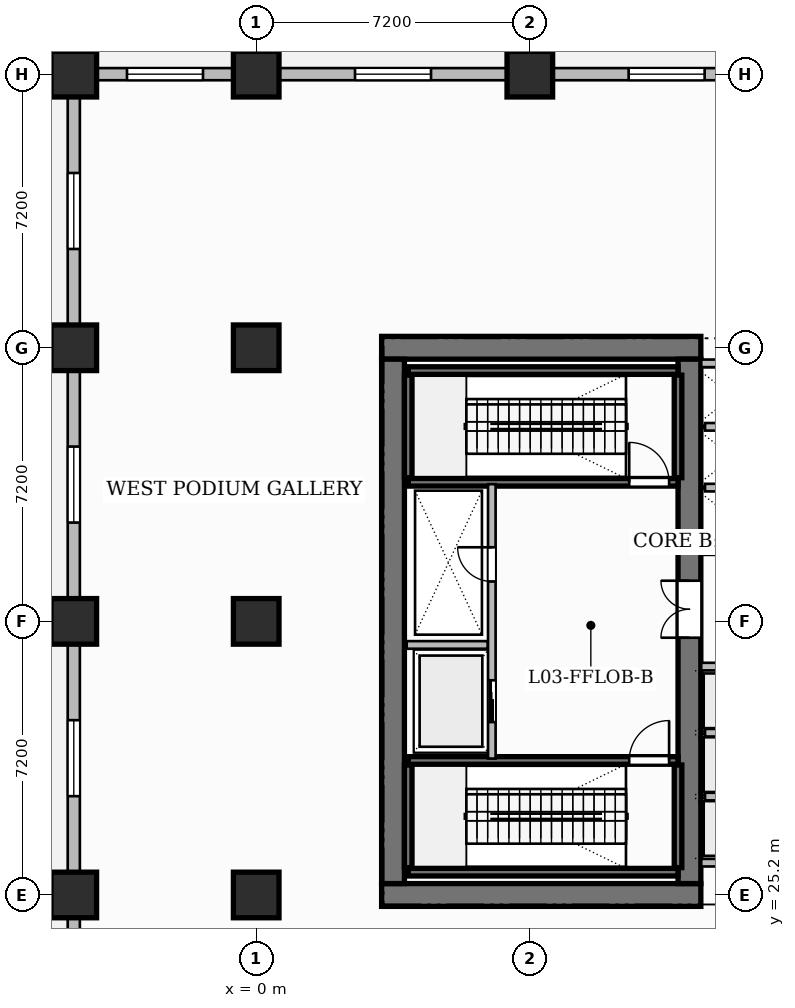
"""IFC4 building model, lengths in metres.
Left out: names, types, materials, properties, quantities, classifications, styles, units other than length and angle.
Written with IfcOpenShell. Run it as: python <this file> out.ifc"""

import sys

from ifc_helpers import new_model, si_unit, direction, frame, frame_2d, origin, origin_2d, place, context, subcontext, project, spatial, rectangle, extrude, source, transform, mapped, element, fill, save


model = new_model("IFC4")
c1 = context("Model", 3, precision=1e-05, world=origin(), true_north=direction((0.0, 1.0)))
c2 = subcontext(c1, "Body", "Model", "MODEL_VIEW")
j1 = project(units=[si_unit("LENGTHUNIT", "METRE"), si_unit("PLANEANGLEUNIT", "RADIAN")], contexts=[c1])
p1 = place(None, origin())
s1 = spatial("IfcSite", under=j1, at=p1, CompositionType="ELEMENT")
p2 = place(p1, origin())
s2 = spatial("IfcBuilding", under=s1, at=p2, CompositionType="ELEMENT")
p3 = place(p2, frame((0.0, 0.0, 16.2)))
s3 = spatial("IfcBuildingStorey", under=s2, at=p3, CompositionType="ELEMENT", Elevation=16.2)
for number, where, z_axis, x_axis in (
    (1, (3.3, 25.2, 0.0), (0.0, 0.0, 1.0), (1.0, 0.0, 0.0)),
    (2, (3.3, 39.6, 0.0), (0.0, 0.0, 1.0), (1.0, 0.0, 0.0)),
):
    element("IfcWall", number, at=place(p3, frame(where, z_axis=z_axis, x_axis=x_axis)), inside=s3, PredefinedType="SHEAR", context=c2, shape_type="SweptSolid", body=[
        extrude(rectangle(XDim=8.4, YDim=0.6, at=frame_2d((4.2, 0.0))), origin(), (0.0, 0.0, 1.0), 5.4),
    ])
p4 = place(p3, frame((3.6, 25.5, 0.0), z_axis=(0.0, 0.0, 1.0), x_axis=(0.0, 1.0, 0.0)))
e3 = element("IfcWall", 3, at=p4, inside=s3, PredefinedType="SHEAR", context=c2, shape_type="SweptSolid", body=[
    extrude(rectangle(XDim=13.8, YDim=0.6, at=frame_2d((6.9, 0.0))), origin(), (0.0, 0.0, 1.0), 5.4),
])
p5 = place(p3, frame((11.4, 25.5, 0.0), z_axis=(0.0, 0.0, 1.0), x_axis=(0.0, 1.0, 0.0)))
e4 = element("IfcWall", 4, at=p5, inside=s3, PredefinedType="SHEAR", context=c2, shape_type="SweptSolid", body=[
    extrude(rectangle(XDim=13.8, YDim=0.6, at=frame_2d((6.9, 0.0))), origin(), (0.0, 0.0, 1.0), 5.4),
])
p6 = place(p5, frame((6.47, 0.0, 0.0)))
e5 = element("IfcOpeningElement", 5, at=p6, cuts=e4, PredefinedType="OPENING", context=c2, shape_type="SweptSolid", body=[
    extrude(rectangle(XDim=1.5, YDim=2.2, at=frame_2d((0.75, 1.1))), frame((0.0, 0.31, 0.0), z_axis=(0.0, -1.0, 0.0), x_axis=(1.0, 0.0, 0.0)), (0.0, 0.0, 1.0), 0.62),
])
m1 = source(origin(), c2, "Body", "SweptSolid", [
    extrude(rectangle(XDim=1.2, YDim=1.2, at=origin_2d()), origin(), (0.0, 0.0, 1.0), 5.4),
])
for number, where, z_axis, x_axis in (
    (6, (-4.8, 25.2, 0.0), (0.0, 0.0, 1.0), (1.0, 0.0, 0.0)),
    (7, (-4.8, 32.4, 0.0), (0.0, 0.0, 1.0), (1.0, 0.0, 0.0)),
    (8, (-4.8, 39.6, 0.0), (0.0, 0.0, 1.0), (1.0, 0.0, 0.0)),
    (9, (-4.8, 46.8, 0.0), (0.0, 0.0, 1.0), (1.0, 0.0, 0.0)),
    (10, (0.0, 25.2, 0.0), (0.0, 0.0, 1.0), (1.0, 0.0, 0.0)),
    (11, (0.0, 32.4, 0.0), (0.0, 0.0, 1.0), (1.0, 0.0, 0.0)),
    (12, (0.0, 39.6, 0.0), (0.0, 0.0, 1.0), (1.0, 0.0, 0.0)),
    (13, (0.0, 46.8, 0.0), (0.0, 0.0, 1.0), (1.0, 0.0, 0.0)),
    (14, (7.2, 46.8, 0.0), (0.0, 0.0, 1.0), (1.0, 0.0, 0.0)),
):
    element("IfcColumn", number, at=place(p3, frame(where, z_axis=z_axis, x_axis=x_axis)), inside=s3, PredefinedType="COLUMN", context=c2, shape_type="MappedRepresentation", body=[
        mapped(m1, transform((0.0, 0.0, 0.0), scale=1.0)),
    ])
p7 = place(p3, frame((4.0, 25.8, 0.0), z_axis=(0.0, 0.0, 1.0), x_axis=(1.0, 0.0, 0.0)))
e15 = element("IfcWall", 15, at=p7, inside=s3, PredefinedType="SHEAR", context=c2, shape_type="SweptSolid", body=[
    extrude(rectangle(XDim=7.1, YDim=0.2, at=frame_2d((3.55, 0.0))), origin(), (0.0, 0.0, 1.0), 5.4),
])
for number, where, z_axis, x_axis in (
    (16, (4.0, 25.92, 0.0), (0.0, 0.0, 1.0), (0.0, 1.0, 0.0)),
    (17, (11.1, 25.92, 0.0), (0.0, 0.0, 1.0), (0.0, 1.0, 0.0)),
):
    element("IfcWall", number, at=place(p3, frame(where, z_axis=z_axis, x_axis=x_axis)), inside=s3, PredefinedType="SHEAR", context=c2, shape_type="SweptSolid", body=[
        extrude(rectangle(XDim=2.7, YDim=0.2, at=frame_2d((1.35, 0.0))), origin(), (0.0, 0.0, 1.0), 5.4),
    ])
p8 = place(p3, frame((4.0, 28.74, 0.0), z_axis=(0.0, 0.0, 1.0), x_axis=(1.0, 0.0, 0.0)))
e18 = element("IfcWall", 18, at=p8, inside=s3, PredefinedType="SHEAR", context=c2, shape_type="SweptSolid", body=[
    extrude(rectangle(XDim=7.1, YDim=0.2, at=frame_2d((3.55, 0.0))), origin(), (0.0, 0.0, 1.0), 5.4),
])
p9 = place(p8, frame((5.815, 0.0, 0.0)))
e19 = element("IfcOpeningElement", 19, at=p9, cuts=e18, PredefinedType="OPENING", context=c2, shape_type="SweptSolid", body=[
    extrude(rectangle(XDim=1.05, YDim=2.2, at=frame_2d((0.525, 1.1))), frame((0.0, 0.11, 0.0), z_axis=(0.0, -1.0, 0.0), x_axis=(1.0, 0.0, 0.0)), (0.0, 0.0, 1.0), 0.22),
])
p10 = place(p3, frame((4.0, 39.0, 0.0), z_axis=(0.0, 0.0, 1.0), x_axis=(1.0, 0.0, 0.0)))
e20 = element("IfcWall", 20, at=p10, inside=s3, PredefinedType="SHEAR", context=c2, shape_type="SweptSolid", body=[
    extrude(rectangle(XDim=7.1, YDim=0.2, at=frame_2d((3.55, 0.0))), origin(), (0.0, 0.0, 1.0), 5.4),
])
for number, where, z_axis, x_axis in (
    (21, (4.0, 36.18, 0.0), (0.0, 0.0, 1.0), (0.0, 1.0, 0.0)),
    (22, (11.1, 36.18, 0.0), (0.0, 0.0, 1.0), (0.0, 1.0, 0.0)),
):
    element("IfcWall", number, at=place(p3, frame(where, z_axis=z_axis, x_axis=x_axis)), inside=s3, PredefinedType="SHEAR", context=c2, shape_type="SweptSolid", body=[
        extrude(rectangle(XDim=2.7, YDim=0.2, at=frame_2d((1.35, 0.0))), origin(), (0.0, 0.0, 1.0), 5.4),
    ])
p11 = place(p3, frame((4.0, 36.06, 0.0), z_axis=(0.0, 0.0, 1.0), x_axis=(1.0, 0.0, 0.0)))
e23 = element("IfcWall", 23, at=p11, inside=s3, PredefinedType="SHEAR", context=c2, shape_type="SweptSolid", body=[
    extrude(rectangle(XDim=7.1, YDim=0.2, at=frame_2d((3.55, 0.0))), origin(), (0.0, 0.0, 1.0), 5.4),
])
p12 = place(p11, frame((5.815, 0.0, 0.0)))
e24 = element("IfcOpeningElement", 24, at=p12, cuts=e23, PredefinedType="OPENING", context=c2, shape_type="SweptSolid", body=[
    extrude(rectangle(XDim=1.05, YDim=2.2, at=frame_2d((0.525, 1.1))), frame((0.0, 0.11, 0.0), z_axis=(0.0, -1.0, 0.0), x_axis=(1.0, 0.0, 0.0)), (0.0, 0.0, 1.0), 0.22),
])
p13 = place(p3, frame((6.2, 28.79, 0.0), z_axis=(0.0, 0.0, 1.0), x_axis=(0.0, 1.0, 0.0)))
e25 = element("IfcWall", 25, at=p13, inside=s3, PredefinedType="PARTITIONING", context=c2, shape_type="SweptSolid", body=[
    extrude(rectangle(XDim=7.22, YDim=0.2, at=frame_2d((3.61, 0.0))), origin(), (0.0, 0.0, 1.0), 5.1),
])
p14 = place(p13, frame((4.66, 0.0, 0.0)))
e26 = element("IfcOpeningElement", 26, at=p14, cuts=e25, PredefinedType="OPENING", context=c2, shape_type="SweptSolid", body=[
    extrude(rectangle(XDim=0.9, YDim=2.1, at=frame_2d((0.45, 1.05))), frame((0.0, 0.11, 0.0), z_axis=(0.0, -1.0, 0.0), x_axis=(1.0, 0.0, 0.0)), (0.0, 0.0, 1.0), 0.22),
])
p15 = place(p13, frame((0.96, 0.0, 0.0)))
e27 = element("IfcOpeningElement", 27, at=p15, cuts=e25, PredefinedType="OPENING", context=c2, shape_type="SweptSolid", body=[
    extrude(rectangle(XDim=1.1, YDim=2.2, at=frame_2d((0.55, 1.1))), frame((0.0, 0.11, 0.0), z_axis=(0.0, -1.0, 0.0), x_axis=(1.0, 0.0, 0.0)), (0.0, 0.0, 1.0), 0.22),
])
p16 = place(p3, frame((3.96, 31.78, 0.0), z_axis=(0.0, 0.0, 1.0), x_axis=(1.0, 0.0, 0.0)))
e28 = element("IfcWall", 28, at=p16, inside=s3, PredefinedType="PARTITIONING", context=c2, shape_type="SweptSolid", body=[
    extrude(rectangle(XDim=2.13, YDim=0.2, at=frame_2d((1.065, 0.0))), origin(), (0.0, 0.0, 1.0), 5.1),
])
for number, where, z_axis, x_axis in (
    (29, (11.71, 26.05, 0.0), (0.0, 0.0, 1.0), (1.0, 0.0, 0.0)),
    (30, (11.71, 31.21, 0.0), (0.0, 0.0, 1.0), (1.0, 0.0, 0.0)),
):
    element("IfcWall", number, at=place(p3, frame(where, z_axis=z_axis, x_axis=x_axis)), inside=s3, PredefinedType="PARTITIONING", context=c2, shape_type="SweptSolid", body=[
        extrude(rectangle(XDim=1.96, YDim=0.2, at=frame_2d((0.98, 0.0))), origin(), (0.0, 0.0, 1.0), 5.1),
    ])
for number, where, z_axis, x_axis in (
    (31, (11.81, 27.79, 0.0), (0.0, 0.0, 1.0), (1.0, 0.0, 0.0)),
    (32, (11.81, 29.47, 0.0), (0.0, 0.0, 1.0), (1.0, 0.0, 0.0)),
):
    element("IfcWall", number, at=place(p3, frame(where, z_axis=z_axis, x_axis=x_axis)), inside=s3, PredefinedType="PARTITIONING", context=c2, shape_type="SweptSolid", body=[
        extrude(rectangle(XDim=1.76, YDim=0.2, at=frame_2d((0.88, 0.0))), origin(), (0.0, 0.0, 1.0), 5.1),
    ])
for number, where, z_axis, x_axis in (
    (33, (11.71, 34.25, 0.0), (0.0, 0.0, 1.0), (1.0, 0.0, 0.0)),
    (34, (11.71, 39.19, 0.0), (0.0, 0.0, 1.0), (1.0, 0.0, 0.0)),
):
    element("IfcWall", number, at=place(p3, frame(where, z_axis=z_axis, x_axis=x_axis)), inside=s3, PredefinedType="PARTITIONING", context=c2, shape_type="SweptSolid", body=[
        extrude(rectangle(XDim=1.96, YDim=0.2, at=frame_2d((0.98, 0.0))), origin(), (0.0, 0.0, 1.0), 5.1),
    ])
for number, where, z_axis, x_axis in (
    (35, (11.81, 35.92, 0.0), (0.0, 0.0, 1.0), (1.0, 0.0, 0.0)),
    (36, (11.81, 37.52, 0.0), (0.0, 0.0, 1.0), (1.0, 0.0, 0.0)),
):
    element("IfcWall", number, at=place(p3, frame(where, z_axis=z_axis, x_axis=x_axis)), inside=s3, PredefinedType="PARTITIONING", context=c2, shape_type="SweptSolid", body=[
        extrude(rectangle(XDim=1.76, YDim=0.2, at=frame_2d((0.88, 0.0))), origin(), (0.0, 0.0, 1.0), 5.1),
    ])
p17 = place(p3, frame((-4.8, 46.8, 0.0), z_axis=(0.0, 0.0, 1.0), x_axis=(1.0, 0.0, 0.0)))
e37 = element("IfcWall", 37, at=p17, inside=s3, PredefinedType="SOLIDWALL", context=c2, shape_type="SweptSolid", body=[
    extrude(rectangle(XDim=33.6, YDim=0.32, at=frame_2d((16.8, 0.0))), origin(), (0.0, 0.0, 1.0), 4.185),
])
p18 = place(p17, frame((1.4, 0.0, 0.75)))
e38 = element("IfcOpeningElement", 38, at=p18, cuts=e37, PredefinedType="OPENING", context=c2, shape_type="SweptSolid", body=[
    extrude(rectangle(XDim=2.0, YDim=2.6, at=frame_2d((1.0, 1.3))), frame((0.0, 0.17, 0.0), z_axis=(0.0, -1.0, 0.0), x_axis=(1.0, 0.0, 0.0)), (0.0, 0.0, 1.0), 0.34),
])
p19 = place(p17, frame((7.4, 0.0, 0.75)))
e39 = element("IfcOpeningElement", 39, at=p19, cuts=e37, PredefinedType="OPENING", context=c2, shape_type="SweptSolid", body=[
    extrude(rectangle(XDim=2.0, YDim=2.6, at=frame_2d((1.0, 1.3))), frame((0.0, 0.17, 0.0), z_axis=(0.0, -1.0, 0.0), x_axis=(1.0, 0.0, 0.0)), (0.0, 0.0, 1.0), 0.34),
])
p20 = place(p17, frame((14.6, 0.0, 0.75)))
e40 = element("IfcOpeningElement", 40, at=p20, cuts=e37, PredefinedType="OPENING", context=c2, shape_type="SweptSolid", body=[
    extrude(rectangle(XDim=2.0, YDim=2.6, at=frame_2d((1.0, 1.3))), frame((0.0, 0.17, 0.0), z_axis=(0.0, -1.0, 0.0), x_axis=(1.0, 0.0, 0.0)), (0.0, 0.0, 1.0), 0.34),
])
p21 = place(p17, frame((29.0, 0.0, 0.75)))
e41 = element("IfcOpeningElement", 41, at=p21, cuts=e37, PredefinedType="OPENING", context=c2, shape_type="SweptSolid", body=[
    extrude(rectangle(XDim=2.0, YDim=2.6, at=frame_2d((1.0, 1.3))), frame((0.0, 0.17, 0.0), z_axis=(0.0, -1.0, 0.0), x_axis=(1.0, 0.0, 0.0)), (0.0, 0.0, 1.0), 0.34),
])
p22 = place(p3, frame((-4.8, 0.05, 0.0), z_axis=(0.0, 0.0, 1.0), x_axis=(0.0, 1.0, 0.0)))
e42 = element("IfcWall", 42, at=p22, inside=s3, PredefinedType="SOLIDWALL", context=c2, shape_type="SweptSolid", body=[
    extrude(rectangle(XDim=46.7, YDim=0.32, at=frame_2d((23.35, 0.0))), origin(), (0.0, 0.0, 1.0), 4.185),
])
p23 = place(p22, frame((2.55, 0.0, 0.75)))
e43 = element("IfcOpeningElement", 43, at=p23, cuts=e42, PredefinedType="OPENING", context=c2, shape_type="SweptSolid", body=[
    extrude(rectangle(XDim=2.0, YDim=2.6, at=frame_2d((1.0, 1.3))), frame((0.0, 0.17, 0.0), z_axis=(0.0, -1.0, 0.0), x_axis=(1.0, 0.0, 0.0)), (0.0, 0.0, 1.0), 0.34),
])
p24 = place(p22, frame((9.75, 0.0, 0.75)))
e44 = element("IfcOpeningElement", 44, at=p24, cuts=e42, PredefinedType="OPENING", context=c2, shape_type="SweptSolid", body=[
    extrude(rectangle(XDim=2.0, YDim=2.6, at=frame_2d((1.0, 1.3))), frame((0.0, 0.17, 0.0), z_axis=(0.0, -1.0, 0.0), x_axis=(1.0, 0.0, 0.0)), (0.0, 0.0, 1.0), 0.34),
])
p25 = place(p22, frame((16.95, 0.0, 0.75)))
e45 = element("IfcOpeningElement", 45, at=p25, cuts=e42, PredefinedType="OPENING", context=c2, shape_type="SweptSolid", body=[
    extrude(rectangle(XDim=2.0, YDim=2.6, at=frame_2d((1.0, 1.3))), frame((0.0, 0.17, 0.0), z_axis=(0.0, -1.0, 0.0), x_axis=(1.0, 0.0, 0.0)), (0.0, 0.0, 1.0), 0.34),
])
p26 = place(p22, frame((27.75, 0.0, 0.75)))
e46 = element("IfcOpeningElement", 46, at=p26, cuts=e42, PredefinedType="OPENING", context=c2, shape_type="SweptSolid", body=[
    extrude(rectangle(XDim=2.0, YDim=2.6, at=frame_2d((1.0, 1.3))), frame((0.0, 0.17, 0.0), z_axis=(0.0, -1.0, 0.0), x_axis=(1.0, 0.0, 0.0)), (0.0, 0.0, 1.0), 0.34),
])
p27 = place(p22, frame((34.95, 0.0, 0.75)))
e47 = element("IfcOpeningElement", 47, at=p27, cuts=e42, PredefinedType="OPENING", context=c2, shape_type="SweptSolid", body=[
    extrude(rectangle(XDim=2.0, YDim=2.6, at=frame_2d((1.0, 1.3))), frame((0.0, 0.17, 0.0), z_axis=(0.0, -1.0, 0.0), x_axis=(1.0, 0.0, 0.0)), (0.0, 0.0, 1.0), 0.34),
])
p28 = place(p22, frame((42.15, 0.0, 0.75)))
e48 = element("IfcOpeningElement", 48, at=p28, cuts=e42, PredefinedType="OPENING", context=c2, shape_type="SweptSolid", body=[
    extrude(rectangle(XDim=2.0, YDim=2.6, at=frame_2d((1.0, 1.3))), frame((0.0, 0.17, 0.0), z_axis=(0.0, -1.0, 0.0), x_axis=(1.0, 0.0, 0.0)), (0.0, 0.0, 1.0), 0.34),
])
m2 = source(origin(), c2, "Body", "SweptSolid", [
    extrude(rectangle(XDim=1.05, YDim=2.2, at=frame_2d((0.525, 1.1))), frame((0.0, 0.025, 0.0), z_axis=(0.0, -1.0, 0.0), x_axis=(1.0, 0.0, 0.0)), (0.0, 0.0, 1.0), 0.05),
])
p29 = place(p9, origin())
e49 = element("IfcDoor", 49, at=p29, inside=s3, OperationType="SINGLE_SWING_RIGHT", PredefinedType="DOOR", context=c2, shape_type="MappedRepresentation", body=[
    mapped(m2, transform((0.0, 0.0, 0.0), scale=1.0)),
])
fill(e19, e49)
p30 = place(p12, origin())
e50 = element("IfcDoor", 50, at=p30, inside=s3, OperationType="SINGLE_SWING_LEFT", PredefinedType="DOOR", context=c2, shape_type="MappedRepresentation", body=[
    mapped(m2, transform((0.0, 0.0, 0.0), scale=1.0)),
])
fill(e24, e50)
m3 = source(origin(), c2, "Body", "SweptSolid", [
    extrude(rectangle(XDim=0.9, YDim=2.1, at=frame_2d((0.45, 1.05))), frame((0.0, 0.025, 0.0), z_axis=(0.0, -1.0, 0.0), x_axis=(1.0, 0.0, 0.0)), (0.0, 0.0, 1.0), 0.05),
])
p31 = place(p14, origin())
e51 = element("IfcDoor", 51, at=p31, inside=s3, OperationType="SINGLE_SWING_RIGHT", PredefinedType="DOOR", context=c2, shape_type="MappedRepresentation", body=[
    mapped(m3, transform((0.0, 0.0, 0.0), scale=1.0)),
])
fill(e26, e51)
m4 = source(origin(), c2, "Body", "SweptSolid", [
    extrude(rectangle(XDim=1.5, YDim=2.2, at=frame_2d((0.75, 1.1))), frame((0.0, 0.025, 0.0), z_axis=(0.0, -1.0, 0.0), x_axis=(1.0, 0.0, 0.0)), (0.0, 0.0, 1.0), 0.05),
])
p32 = place(p6, origin())
e52 = element("IfcDoor", 52, at=p32, inside=s3, OperationType="DOUBLE_DOOR_SINGLE_SWING", PredefinedType="DOOR", context=c2, shape_type="MappedRepresentation", body=[
    mapped(m4, transform((0.0, 0.0, 0.0), scale=1.0)),
])
fill(e5, e52)
m5 = source(origin(), c2, "Body", "SweptSolid", [
    extrude(rectangle(XDim=1.1, YDim=2.2, at=frame_2d((0.55, 1.1))), frame((0.0, 0.025, 0.0), z_axis=(0.0, -1.0, 0.0), x_axis=(1.0, 0.0, 0.0)), (0.0, 0.0, 1.0), 0.05),
])
p33 = place(p15, origin())
e53 = element("IfcDoor", 53, at=p33, inside=s3, OperationType="SLIDING_TO_LEFT", PredefinedType="DOOR", context=c2, shape_type="MappedRepresentation", body=[
    mapped(m5, transform((0.0, 0.0, 0.0), scale=1.0)),
])
fill(e27, e53)
m6 = source(origin(), c2, "Body", "SweptSolid", [
    extrude(rectangle(XDim=2.0, YDim=2.6, at=frame_2d((1.0, 1.3))), frame((0.0, 0.03, 0.0), z_axis=(0.0, -1.0, 0.0), x_axis=(1.0, 0.0, 0.0)), (0.0, 0.0, 1.0), 0.06),
])
p34 = place(p18, origin())
e54 = element("IfcWindow", 54, at=p34, inside=s3, PartitioningType="DOUBLE_PANEL_VERTICAL", PredefinedType="WINDOW", context=c2, shape_type="MappedRepresentation", body=[
    mapped(m6, transform((0.0, 0.0, 0.0), scale=1.0)),
])
fill(e38, e54)
p35 = place(p19, origin())
e55 = element("IfcWindow", 55, at=p35, inside=s3, PartitioningType="DOUBLE_PANEL_VERTICAL", PredefinedType="WINDOW", context=c2, shape_type="MappedRepresentation", body=[
    mapped(m6, transform((0.0, 0.0, 0.0), scale=1.0)),
])
fill(e39, e55)
p36 = place(p20, origin())
e56 = element("IfcWindow", 56, at=p36, inside=s3, PartitioningType="DOUBLE_PANEL_VERTICAL", PredefinedType="WINDOW", context=c2, shape_type="MappedRepresentation", body=[
    mapped(m6, transform((0.0, 0.0, 0.0), scale=1.0)),
])
fill(e40, e56)
p37 = place(p26, origin())
e57 = element("IfcWindow", 57, at=p37, inside=s3, PartitioningType="DOUBLE_PANEL_VERTICAL", PredefinedType="WINDOW", context=c2, shape_type="MappedRepresentation", body=[
    mapped(m6, transform((0.0, 0.0, 0.0), scale=1.0)),
])
fill(e46, e57)
p38 = place(p27, origin())
e58 = element("IfcWindow", 58, at=p38, inside=s3, PartitioningType="DOUBLE_PANEL_VERTICAL", PredefinedType="WINDOW", context=c2, shape_type="MappedRepresentation", body=[
    mapped(m6, transform((0.0, 0.0, 0.0), scale=1.0)),
])
fill(e47, e58)
p39 = place(p28, origin())
e59 = element("IfcWindow", 59, at=p39, inside=s3, PartitioningType="DOUBLE_PANEL_VERTICAL", PredefinedType="WINDOW", context=c2, shape_type="MappedRepresentation", body=[
    mapped(m6, transform((0.0, 0.0, 0.0), scale=1.0)),
])
fill(e48, e59)
save(model, sys.argv[1])
